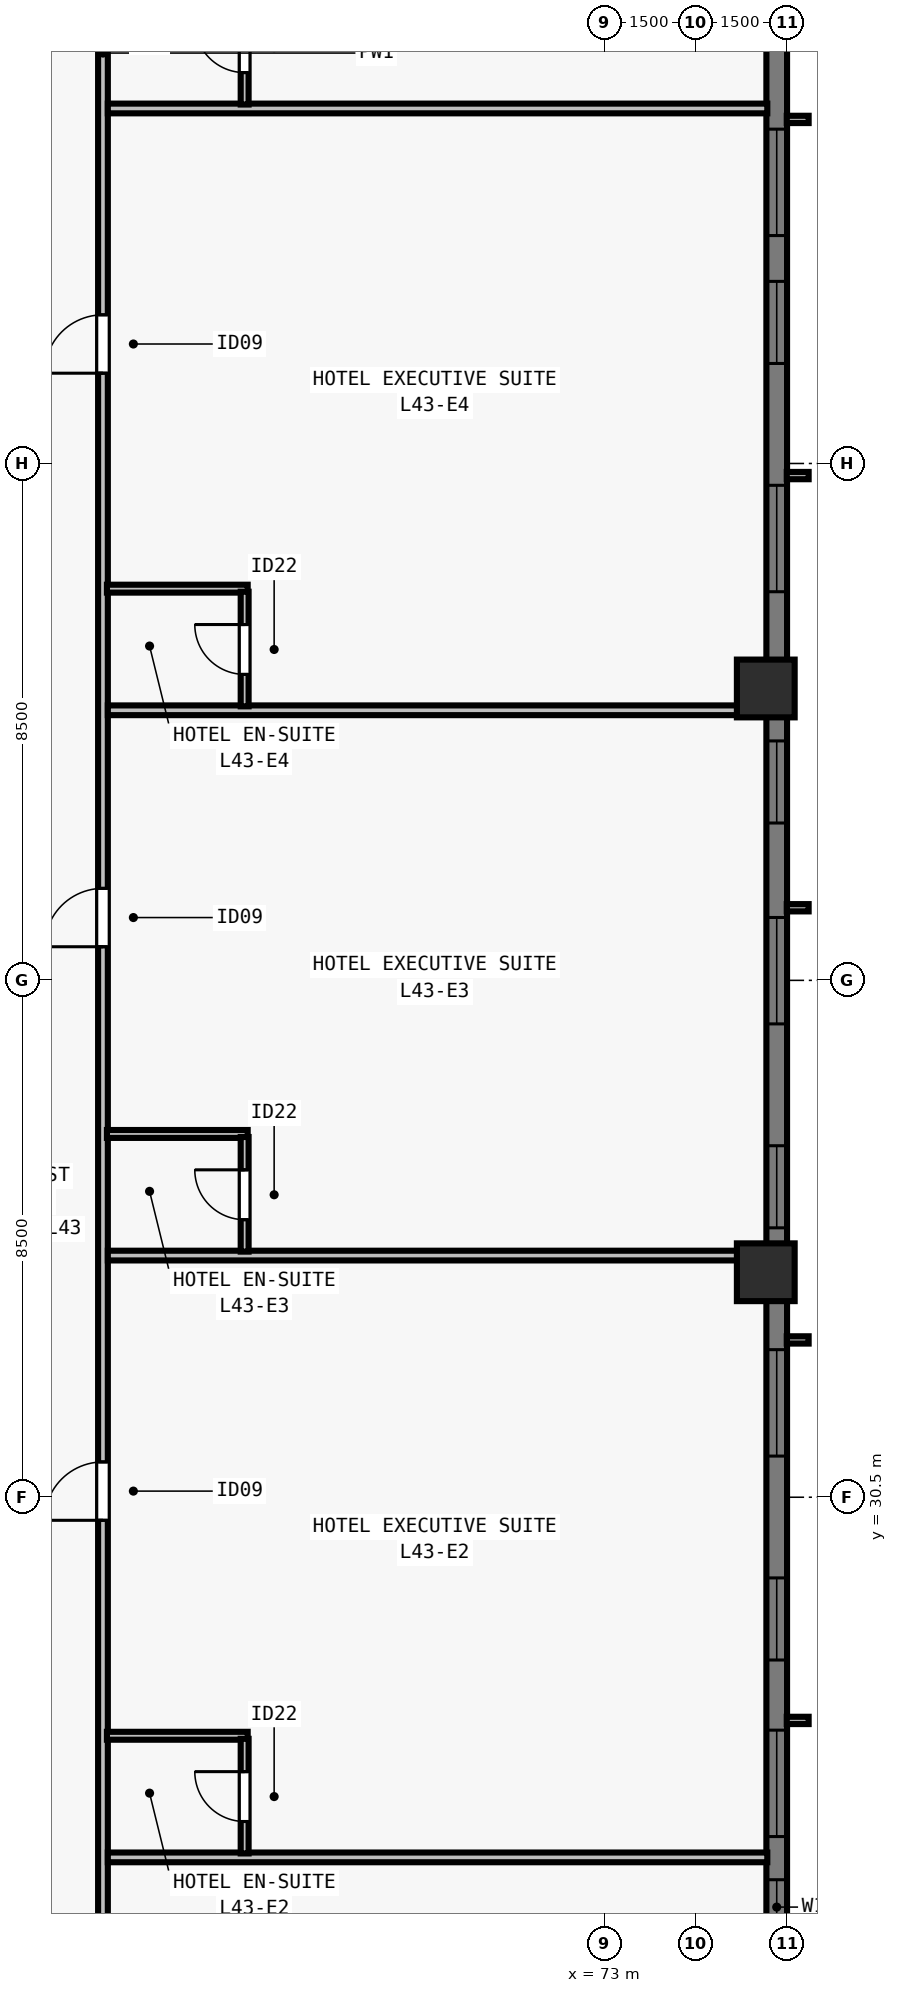
"""IFC4 building model, lengths in metres.
Left out: names, types, materials, properties, quantities, classifications, styles, units other than length and angle.
Written with IfcOpenShell. Run it as: python <this file> out.ifc"""

import sys

from ifc_helpers import new_model, si_unit, direction, frame, frame_2d, origin, origin_2d, place, context, subcontext, project, spatial, rectangle, extrude, element, fill, save


model = new_model("IFC4")
c1 = context("Model", 3, precision=1e-05, world=origin(), true_north=direction((0.0, 1.0)))
c2 = subcontext(c1, "Body", "Model", "MODEL_VIEW")
j1 = project(units=[si_unit("LENGTHUNIT", "METRE"), si_unit("PLANEANGLEUNIT", "RADIAN")], contexts=[c1])
p1 = place(None, origin())
s1 = spatial("IfcSite", under=j1, at=p1, CompositionType="ELEMENT")
p2 = place(p1, origin())
s2 = spatial("IfcBuilding", under=s1, at=p2, CompositionType="ELEMENT")
p3 = place(p2, frame((0.0, 0.0, 158.5)))
s3 = spatial("IfcBuildingStorey", under=s2, at=p3, CompositionType="ELEMENT", Elevation=158.5)
for number, where, z_axis, x_axis in (
    (1, (75.65, 34.2, 0.0), (0.0, 0.0, 1.0), (0.0, 1.0, 0.0)),
    (2, (75.65, 43.8, 0.0), (0.0, 0.0, 1.0), (0.0, 1.0, 0.0)),
):
    element("IfcColumn", number, at=place(p3, frame(where, z_axis=z_axis, x_axis=x_axis)), inside=s3, PredefinedType="COLUMN", context=c2, shape_type="SweptSolid", body=[
        extrude(rectangle(XDim=0.95, YDim=0.95, at=origin_2d()), origin(), (0.0, 0.0, 1.0), 3.5),
    ])
p4 = place(p3, frame((75.83, 59.0, 0.0), z_axis=(0.0, 0.0, 1.0), x_axis=(0.0, -1.0, 0.0)))
e3 = element("IfcWall", 3, at=p4, inside=s3, PredefinedType="SOLIDWALL", context=c2, shape_type="SweptSolid", body=[
    extrude(rectangle(XDim=39.682, YDim=0.34, at=frame_2d((19.841, 0.0))), origin(), (0.0, 0.0, 1.0), 3.28),
])
p5 = place(p4, frame((6.002, 0.0, 0.8)))
e4 = element("IfcOpeningElement", 4, at=p5, cuts=e3, PredefinedType="OPENING", context=c2, shape_type="SweptSolid", body=[
    extrude(rectangle(XDim=1.75, YDim=1.66, at=frame_2d((0.875, 0.83))), frame((0.0, 0.18, 0.0), z_axis=(0.0, -1.0, 0.0), x_axis=(1.0, 0.0, 0.0)), (0.0, 0.0, 1.0), 0.36),
])
p6 = place(p4, frame((8.505, 0.0, 0.8)))
e5 = element("IfcOpeningElement", 5, at=p6, cuts=e3, PredefinedType="OPENING", context=c2, shape_type="SweptSolid", body=[
    extrude(rectangle(XDim=1.35, YDim=1.66, at=frame_2d((0.675, 0.83))), frame((0.0, 0.18, 0.0), z_axis=(0.0, -1.0, 0.0), x_axis=(1.0, 0.0, 0.0)), (0.0, 0.0, 1.0), 0.36),
])
p7 = place(p4, frame((11.859, 0.0, 0.8)))
e6 = element("IfcOpeningElement", 6, at=p7, cuts=e3, PredefinedType="OPENING", context=c2, shape_type="SweptSolid", body=[
    extrude(rectangle(XDim=1.75, YDim=1.66, at=frame_2d((0.875, 0.83))), frame((0.0, 0.18, 0.0), z_axis=(0.0, -1.0, 0.0), x_axis=(1.0, 0.0, 0.0)), (0.0, 0.0, 1.0), 0.36),
])
p8 = place(p4, frame((16.062, 0.0, 0.8)))
e7 = element("IfcOpeningElement", 7, at=p8, cuts=e3, PredefinedType="OPENING", context=c2, shape_type="SweptSolid", body=[
    extrude(rectangle(XDim=1.35, YDim=1.66, at=frame_2d((0.675, 0.83))), frame((0.0, 0.18, 0.0), z_axis=(0.0, -1.0, 0.0), x_axis=(1.0, 0.0, 0.0)), (0.0, 0.0, 1.0), 0.36),
])
p9 = place(p4, frame((18.966, 0.0, 0.8)))
e8 = element("IfcOpeningElement", 8, at=p9, cuts=e3, PredefinedType="OPENING", context=c2, shape_type="SweptSolid", body=[
    extrude(rectangle(XDim=1.75, YDim=1.66, at=frame_2d((0.875, 0.83))), frame((0.0, 0.18, 0.0), z_axis=(0.0, -1.0, 0.0), x_axis=(1.0, 0.0, 0.0)), (0.0, 0.0, 1.0), 0.36),
])
p10 = place(p4, frame((22.719, 0.0, 0.8)))
e9 = element("IfcOpeningElement", 9, at=p10, cuts=e3, PredefinedType="OPENING", context=c2, shape_type="SweptSolid", body=[
    extrude(rectangle(XDim=1.35, YDim=1.66, at=frame_2d((0.675, 0.83))), frame((0.0, 0.18, 0.0), z_axis=(0.0, -1.0, 0.0), x_axis=(1.0, 0.0, 0.0)), (0.0, 0.0, 1.0), 0.36),
])
p11 = place(p4, frame((26.073, 0.0, 0.8)))
e10 = element("IfcOpeningElement", 10, at=p11, cuts=e3, PredefinedType="OPENING", context=c2, shape_type="SweptSolid", body=[
    extrude(rectangle(XDim=1.75, YDim=1.66, at=frame_2d((0.875, 0.83))), frame((0.0, 0.18, 0.0), z_axis=(0.0, -1.0, 0.0), x_axis=(1.0, 0.0, 0.0)), (0.0, 0.0, 1.0), 0.36),
])
p12 = place(p4, frame((29.827, 0.0, 0.8)))
e11 = element("IfcOpeningElement", 11, at=p12, cuts=e3, PredefinedType="OPENING", context=c2, shape_type="SweptSolid", body=[
    extrude(rectangle(XDim=1.35, YDim=1.66, at=frame_2d((0.675, 0.83))), frame((0.0, 0.18, 0.0), z_axis=(0.0, -1.0, 0.0), x_axis=(1.0, 0.0, 0.0)), (0.0, 0.0, 1.0), 0.36),
])
p13 = place(p4, frame((32.33, 0.0, 0.8)))
e12 = element("IfcOpeningElement", 12, at=p13, cuts=e3, PredefinedType="OPENING", context=c2, shape_type="SweptSolid", body=[
    extrude(rectangle(XDim=1.75, YDim=1.66, at=frame_2d((0.875, 0.83))), frame((0.0, 0.18, 0.0), z_axis=(0.0, -1.0, 0.0), x_axis=(1.0, 0.0, 0.0)), (0.0, 0.0, 1.0), 0.36),
])
p14 = place(p4, frame((34.79, 0.0, 0.8)))
e13 = element("IfcOpeningElement", 13, at=p14, cuts=e3, PredefinedType="OPENING", context=c2, shape_type="SweptSolid", body=[
    extrude(rectangle(XDim=0.9, YDim=1.66, at=frame_2d((0.45, 0.83))), frame((0.0, 0.18, 0.0), z_axis=(0.0, -1.0, 0.0), x_axis=(1.0, 0.0, 0.0)), (0.0, 0.0, 1.0), 0.36),
])
p15 = place(p3, frame((64.75, 15.325, 0.0), z_axis=(0.0, 0.0, 1.0), x_axis=(0.0, 1.0, 0.0)))
e14 = element("IfcWall", 14, at=p15, inside=s3, PredefinedType="PARTITIONING", context=c2, shape_type="SweptSolid", body=[
    extrude(rectangle(XDim=47.35, YDim=0.16, at=frame_2d((23.675, 0.0))), origin(), (0.0, 0.0, 1.0), 2.555),
])
p16 = place(p15, frame((5.494, 0.0, 0.0)))
e15 = element("IfcOpeningElement", 15, at=p16, cuts=e14, PredefinedType="OPENING", context=c2, shape_type="SweptSolid", body=[
    extrude(rectangle(XDim=0.96, YDim=2.15, at=frame_2d((0.48, 1.075))), frame((0.0, 0.09, 0.0), z_axis=(0.0, -1.0, 0.0), x_axis=(1.0, 0.0, 0.0)), (0.0, 0.0, 1.0), 0.18),
])
p17 = place(p15, frame((14.796, 0.0, 0.0)))
e16 = element("IfcOpeningElement", 16, at=p17, cuts=e14, PredefinedType="OPENING", context=c2, shape_type="SweptSolid", body=[
    extrude(rectangle(XDim=0.96, YDim=2.15, at=frame_2d((0.48, 1.075))), frame((0.0, 0.09, 0.0), z_axis=(0.0, -1.0, 0.0), x_axis=(1.0, 0.0, 0.0)), (0.0, 0.0, 1.0), 0.18),
])
p18 = place(p15, frame((24.228, 0.0, 0.0)))
e17 = element("IfcOpeningElement", 17, at=p18, cuts=e14, PredefinedType="OPENING", context=c2, shape_type="SweptSolid", body=[
    extrude(rectangle(XDim=0.96, YDim=2.15, at=frame_2d((0.48, 1.075))), frame((0.0, 0.09, 0.0), z_axis=(0.0, -1.0, 0.0), x_axis=(1.0, 0.0, 0.0)), (0.0, 0.0, 1.0), 0.18),
])
p19 = place(p15, frame((33.66, 0.0, 0.0)))
e18 = element("IfcOpeningElement", 18, at=p19, cuts=e14, PredefinedType="OPENING", context=c2, shape_type="SweptSolid", body=[
    extrude(rectangle(XDim=0.96, YDim=2.15, at=frame_2d((0.48, 1.075))), frame((0.0, 0.09, 0.0), z_axis=(0.0, -1.0, 0.0), x_axis=(1.0, 0.0, 0.0)), (0.0, 0.0, 1.0), 0.18),
])
p20 = place(p15, frame((43.229, 0.0, 0.0)))
e19 = element("IfcOpeningElement", 19, at=p20, cuts=e14, PredefinedType="OPENING", context=c2, shape_type="SweptSolid", body=[
    extrude(rectangle(XDim=0.96, YDim=2.15, at=frame_2d((0.48, 1.075))), frame((0.0, 0.09, 0.0), z_axis=(0.0, -1.0, 0.0), x_axis=(1.0, 0.0, 0.0)), (0.0, 0.0, 1.0), 0.18),
])
p21 = place(p3, frame((64.83, 24.577, 0.0), z_axis=(0.0, 0.0, 1.0), x_axis=(1.0, 0.0, 0.0)))
e20 = element("IfcWall", 20, at=p21, inside=s3, PredefinedType="PARTITIONING", context=c2, shape_type="SweptSolid", body=[
    extrude(rectangle(XDim=10.845, YDim=0.16, at=frame_2d((5.422, 0.0))), origin(), (0.0, 0.0, 1.0), 2.896),
])
p22 = place(p3, frame((64.815, 26.577, 0.0), z_axis=(0.0, 0.0, 1.0), x_axis=(1.0, 0.0, 0.0)))
e21 = element("IfcWall", 21, at=p22, inside=s3, PredefinedType="PLUMBINGWALL", context=c2, shape_type="SweptSolid", body=[
    extrude(rectangle(XDim=2.315, YDim=0.13, at=frame_2d((1.157, 0.0))), origin(), (0.0, 0.0, 1.0), 2.896),
])
p23 = place(p3, frame((67.08, 24.642, 0.0), z_axis=(0.0, 0.0, 1.0), x_axis=(0.0, 1.0, 0.0)))
e22 = element("IfcWall", 22, at=p23, inside=s3, PredefinedType="PLUMBINGWALL", context=c2, shape_type="SweptSolid", body=[
    extrude(rectangle(XDim=1.885, YDim=0.13, at=frame_2d((0.942, 0.0))), origin(), (0.0, 0.0, 1.0), 3.28),
])
p24 = place(p23, frame((0.525, 0.0, 0.0)))
e23 = element("IfcOpeningElement", 23, at=p24, cuts=e22, PredefinedType="OPENING", context=c2, shape_type="SweptSolid", body=[
    extrude(rectangle(XDim=0.82, YDim=2.1, at=frame_2d((0.41, 1.05))), frame((0.0, 0.075, 0.0), z_axis=(0.0, -1.0, 0.0), x_axis=(1.0, 0.0, 0.0)), (0.0, 0.0, 1.0), 0.15),
])
p25 = place(p3, frame((64.83, 34.474, 0.0), z_axis=(0.0, 0.0, 1.0), x_axis=(1.0, 0.0, 0.0)))
e24 = element("IfcWall", 24, at=p25, inside=s3, PredefinedType="PARTITIONING", context=c2, shape_type="SweptSolid", body=[
    extrude(rectangle(XDim=10.845, YDim=0.16, at=frame_2d((5.422, 0.0))), origin(), (0.0, 0.0, 1.0), 3.28),
])
p26 = place(p3, frame((64.815, 36.474, 0.0), z_axis=(0.0, 0.0, 1.0), x_axis=(1.0, 0.0, 0.0)))
e25 = element("IfcWall", 25, at=p26, inside=s3, PredefinedType="PLUMBINGWALL", context=c2, shape_type="SweptSolid", body=[
    extrude(rectangle(XDim=2.315, YDim=0.13, at=frame_2d((1.157, 0.0))), origin(), (0.0, 0.0, 1.0), 3.28),
])
p27 = place(p3, frame((67.08, 34.539, 0.0), z_axis=(0.0, 0.0, 1.0), x_axis=(0.0, 1.0, 0.0)))
e26 = element("IfcWall", 26, at=p27, inside=s3, PredefinedType="PLUMBINGWALL", context=c2, shape_type="SweptSolid", body=[
    extrude(rectangle(XDim=1.885, YDim=0.13, at=frame_2d((0.942, 0.0))), origin(), (0.0, 0.0, 1.0), 3.28),
])
p28 = place(p27, frame((0.525, 0.0, 0.0)))
e27 = element("IfcOpeningElement", 27, at=p28, cuts=e26, PredefinedType="OPENING", context=c2, shape_type="SweptSolid", body=[
    extrude(rectangle(XDim=0.82, YDim=2.1, at=frame_2d((0.41, 1.05))), frame((0.0, 0.075, 0.0), z_axis=(0.0, -1.0, 0.0), x_axis=(1.0, 0.0, 0.0)), (0.0, 0.0, 1.0), 0.15),
])
p29 = place(p3, frame((64.83, 43.441, 0.0), z_axis=(0.0, 0.0, 1.0), x_axis=(1.0, 0.0, 0.0)))
e28 = element("IfcWall", 28, at=p29, inside=s3, PredefinedType="PARTITIONING", context=c2, shape_type="SweptSolid", body=[
    extrude(rectangle(XDim=10.845, YDim=0.16, at=frame_2d((5.422, 0.0))), origin(), (0.0, 0.0, 1.0), 3.28),
])
p30 = place(p3, frame((64.815, 45.441, 0.0), z_axis=(0.0, 0.0, 1.0), x_axis=(1.0, 0.0, 0.0)))
e29 = element("IfcWall", 29, at=p30, inside=s3, PredefinedType="PLUMBINGWALL", context=c2, shape_type="SweptSolid", body=[
    extrude(rectangle(XDim=2.315, YDim=0.13, at=frame_2d((1.157, 0.0))), origin(), (0.0, 0.0, 1.0), 3.28),
])
p31 = place(p3, frame((67.08, 43.506, 0.0), z_axis=(0.0, 0.0, 1.0), x_axis=(0.0, 1.0, 0.0)))
e30 = element("IfcWall", 30, at=p31, inside=s3, PredefinedType="PLUMBINGWALL", context=c2, shape_type="SweptSolid", body=[
    extrude(rectangle(XDim=1.885, YDim=0.13, at=frame_2d((0.942, 0.0))), origin(), (0.0, 0.0, 1.0), 3.28),
])
p32 = place(p31, frame((0.525, 0.0, 0.0)))
e31 = element("IfcOpeningElement", 31, at=p32, cuts=e30, PredefinedType="OPENING", context=c2, shape_type="SweptSolid", body=[
    extrude(rectangle(XDim=0.82, YDim=2.1, at=frame_2d((0.41, 1.05))), frame((0.0, 0.075, 0.0), z_axis=(0.0, -1.0, 0.0), x_axis=(1.0, 0.0, 0.0)), (0.0, 0.0, 1.0), 0.15),
])
p33 = place(p3, frame((64.83, 53.338, 0.0), z_axis=(0.0, 0.0, 1.0), x_axis=(1.0, 0.0, 0.0)))
e32 = element("IfcWall", 32, at=p33, inside=s3, PredefinedType="PARTITIONING", context=c2, shape_type="SweptSolid", body=[
    extrude(rectangle(XDim=10.845, YDim=0.16, at=frame_2d((5.422, 0.0))), origin(), (0.0, 0.0, 1.0), 2.896),
])
p34 = place(p3, frame((67.08, 53.403, 0.0), z_axis=(0.0, 0.0, 1.0), x_axis=(0.0, 1.0, 0.0)))
e33 = element("IfcWall", 33, at=p34, inside=s3, PredefinedType="PLUMBINGWALL", context=c2, shape_type="SweptSolid", body=[
    extrude(rectangle(XDim=1.885, YDim=0.13, at=frame_2d((0.942, 0.0))), origin(), (0.0, 0.0, 1.0), 3.28),
])
p35 = place(p34, frame((0.525, 0.0, 0.0)))
e34 = element("IfcOpeningElement", 34, at=p35, cuts=e33, PredefinedType="OPENING", context=c2, shape_type="SweptSolid", body=[
    extrude(rectangle(XDim=0.82, YDim=2.1, at=frame_2d((0.41, 1.05))), frame((0.0, 0.075, 0.0), z_axis=(0.0, -1.0, 0.0), x_axis=(1.0, 0.0, 0.0)), (0.0, 0.0, 1.0), 0.15),
])
p36 = place(p5, origin())
e35 = element("IfcWindow", 35, at=p36, inside=s3, PartitioningType="SINGLE_PANEL", PredefinedType="WINDOW", context=c2, shape_type="SweptSolid", body=[
    extrude(rectangle(XDim=1.75, YDim=1.66, at=frame_2d((0.875, 0.83))), frame((0.0, -0.05, 0.0), z_axis=(0.0, -1.0, 0.0), x_axis=(1.0, 0.0, 0.0)), (0.0, 0.0, 1.0), 0.06),
])
fill(e4, e35)
p37 = place(p6, origin())
e36 = element("IfcWindow", 36, at=p37, inside=s3, PartitioningType="SINGLE_PANEL", PredefinedType="WINDOW", context=c2, shape_type="SweptSolid", body=[
    extrude(rectangle(XDim=1.35, YDim=1.66, at=frame_2d((0.675, 0.83))), frame((0.0, -0.05, 0.0), z_axis=(0.0, -1.0, 0.0), x_axis=(1.0, 0.0, 0.0)), (0.0, 0.0, 1.0), 0.06),
])
fill(e5, e36)
p38 = place(p7, origin())
e37 = element("IfcWindow", 37, at=p38, inside=s3, PartitioningType="SINGLE_PANEL", PredefinedType="WINDOW", context=c2, shape_type="SweptSolid", body=[
    extrude(rectangle(XDim=1.75, YDim=1.66, at=frame_2d((0.875, 0.83))), frame((0.0, -0.05, 0.0), z_axis=(0.0, -1.0, 0.0), x_axis=(1.0, 0.0, 0.0)), (0.0, 0.0, 1.0), 0.06),
])
fill(e6, e37)
p39 = place(p8, origin())
e38 = element("IfcWindow", 38, at=p39, inside=s3, PartitioningType="SINGLE_PANEL", PredefinedType="WINDOW", context=c2, shape_type="SweptSolid", body=[
    extrude(rectangle(XDim=1.35, YDim=1.66, at=frame_2d((0.675, 0.83))), frame((0.0, -0.05, 0.0), z_axis=(0.0, -1.0, 0.0), x_axis=(1.0, 0.0, 0.0)), (0.0, 0.0, 1.0), 0.06),
])
fill(e7, e38)
p40 = place(p9, origin())
e39 = element("IfcWindow", 39, at=p40, inside=s3, PartitioningType="SINGLE_PANEL", PredefinedType="WINDOW", context=c2, shape_type="SweptSolid", body=[
    extrude(rectangle(XDim=1.75, YDim=1.66, at=frame_2d((0.875, 0.83))), frame((0.0, -0.05, 0.0), z_axis=(0.0, -1.0, 0.0), x_axis=(1.0, 0.0, 0.0)), (0.0, 0.0, 1.0), 0.06),
])
fill(e8, e39)
p41 = place(p10, origin())
e40 = element("IfcWindow", 40, at=p41, inside=s3, PartitioningType="SINGLE_PANEL", PredefinedType="WINDOW", context=c2, shape_type="SweptSolid", body=[
    extrude(rectangle(XDim=1.35, YDim=1.66, at=frame_2d((0.675, 0.83))), frame((0.0, -0.05, 0.0), z_axis=(0.0, -1.0, 0.0), x_axis=(1.0, 0.0, 0.0)), (0.0, 0.0, 1.0), 0.06),
])
fill(e9, e40)
p42 = place(p11, origin())
e41 = element("IfcWindow", 41, at=p42, inside=s3, PartitioningType="SINGLE_PANEL", PredefinedType="WINDOW", context=c2, shape_type="SweptSolid", body=[
    extrude(rectangle(XDim=1.75, YDim=1.66, at=frame_2d((0.875, 0.83))), frame((0.0, -0.05, 0.0), z_axis=(0.0, -1.0, 0.0), x_axis=(1.0, 0.0, 0.0)), (0.0, 0.0, 1.0), 0.06),
])
fill(e10, e41)
p43 = place(p12, origin())
e42 = element("IfcWindow", 42, at=p43, inside=s3, PartitioningType="SINGLE_PANEL", PredefinedType="WINDOW", context=c2, shape_type="SweptSolid", body=[
    extrude(rectangle(XDim=1.35, YDim=1.66, at=frame_2d((0.675, 0.83))), frame((0.0, -0.05, 0.0), z_axis=(0.0, -1.0, 0.0), x_axis=(1.0, 0.0, 0.0)), (0.0, 0.0, 1.0), 0.06),
])
fill(e11, e42)
p44 = place(p13, origin())
e43 = element("IfcWindow", 43, at=p44, inside=s3, PartitioningType="SINGLE_PANEL", PredefinedType="WINDOW", context=c2, shape_type="SweptSolid", body=[
    extrude(rectangle(XDim=1.75, YDim=1.66, at=frame_2d((0.875, 0.83))), frame((0.0, -0.05, 0.0), z_axis=(0.0, -1.0, 0.0), x_axis=(1.0, 0.0, 0.0)), (0.0, 0.0, 1.0), 0.06),
])
fill(e12, e43)
p45 = place(p14, origin())
e44 = element("IfcWindow", 44, at=p45, inside=s3, PartitioningType="SINGLE_PANEL", PredefinedType="WINDOW", context=c2, shape_type="SweptSolid", body=[
    extrude(rectangle(XDim=0.9, YDim=1.66, at=frame_2d((0.45, 0.83))), frame((0.0, -0.04, 0.0), z_axis=(0.0, -1.0, 0.0), x_axis=(1.0, 0.0, 0.0)), (0.0, 0.0, 1.0), 0.06),
])
fill(e13, e44)
p46 = place(p24, origin())
e45 = element("IfcDoor", 45, at=p46, inside=s3, OperationType="SINGLE_SWING_RIGHT", PredefinedType="DOOR", context=c2, shape_type="SweptSolid", body=[
    extrude(rectangle(XDim=0.82, YDim=2.1, at=frame_2d((0.41, 1.05))), frame((0.0, 0.025, 0.0), z_axis=(0.0, -1.0, 0.0), x_axis=(1.0, 0.0, 0.0)), (0.0, 0.0, 1.0), 0.05),
])
fill(e23, e45)
p47 = place(p17, origin())
e46 = element("IfcDoor", 46, at=p47, inside=s3, OperationType="SINGLE_SWING_LEFT", PredefinedType="DOOR", context=c2, shape_type="SweptSolid", body=[
    extrude(rectangle(XDim=0.96, YDim=2.15, at=frame_2d((0.48, 1.075))), frame((0.0, 0.025, 0.0), z_axis=(0.0, -1.0, 0.0), x_axis=(1.0, 0.0, 0.0)), (0.0, 0.0, 1.0), 0.05),
])
fill(e16, e46)
p48 = place(p28, origin())
e47 = element("IfcDoor", 47, at=p48, inside=s3, OperationType="SINGLE_SWING_RIGHT", PredefinedType="DOOR", context=c2, shape_type="SweptSolid", body=[
    extrude(rectangle(XDim=0.82, YDim=2.1, at=frame_2d((0.41, 1.05))), frame((0.0, 0.025, 0.0), z_axis=(0.0, -1.0, 0.0), x_axis=(1.0, 0.0, 0.0)), (0.0, 0.0, 1.0), 0.05),
])
fill(e27, e47)
p49 = place(p18, origin())
e48 = element("IfcDoor", 48, at=p49, inside=s3, OperationType="SINGLE_SWING_LEFT", PredefinedType="DOOR", context=c2, shape_type="SweptSolid", body=[
    extrude(rectangle(XDim=0.96, YDim=2.15, at=frame_2d((0.48, 1.075))), frame((0.0, 0.025, 0.0), z_axis=(0.0, -1.0, 0.0), x_axis=(1.0, 0.0, 0.0)), (0.0, 0.0, 1.0), 0.05),
])
fill(e17, e48)
p50 = place(p32, origin())
e49 = element("IfcDoor", 49, at=p50, inside=s3, OperationType="SINGLE_SWING_RIGHT", PredefinedType="DOOR", context=c2, shape_type="SweptSolid", body=[
    extrude(rectangle(XDim=0.82, YDim=2.1, at=frame_2d((0.41, 1.05))), frame((0.0, 0.025, 0.0), z_axis=(0.0, -1.0, 0.0), x_axis=(1.0, 0.0, 0.0)), (0.0, 0.0, 1.0), 0.05),
])
fill(e31, e49)
p51 = place(p19, origin())
e50 = element("IfcDoor", 50, at=p51, inside=s3, OperationType="SINGLE_SWING_LEFT", PredefinedType="DOOR", context=c2, shape_type="SweptSolid", body=[
    extrude(rectangle(XDim=0.96, YDim=2.15, at=frame_2d((0.48, 1.075))), frame((0.0, 0.025, 0.0), z_axis=(0.0, -1.0, 0.0), x_axis=(1.0, 0.0, 0.0)), (0.0, 0.0, 1.0), 0.05),
])
fill(e18, e50)
p52 = place(p35, origin())
e51 = element("IfcDoor", 51, at=p52, inside=s3, OperationType="SINGLE_SWING_RIGHT", PredefinedType="DOOR", context=c2, shape_type="SweptSolid", body=[
    extrude(rectangle(XDim=0.82, YDim=2.1, at=frame_2d((0.41, 1.05))), frame((0.0, 0.025, 0.0), z_axis=(0.0, -1.0, 0.0), x_axis=(1.0, 0.0, 0.0)), (0.0, 0.0, 1.0), 0.05),
])
fill(e34, e51)
save(model, sys.argv[1])
